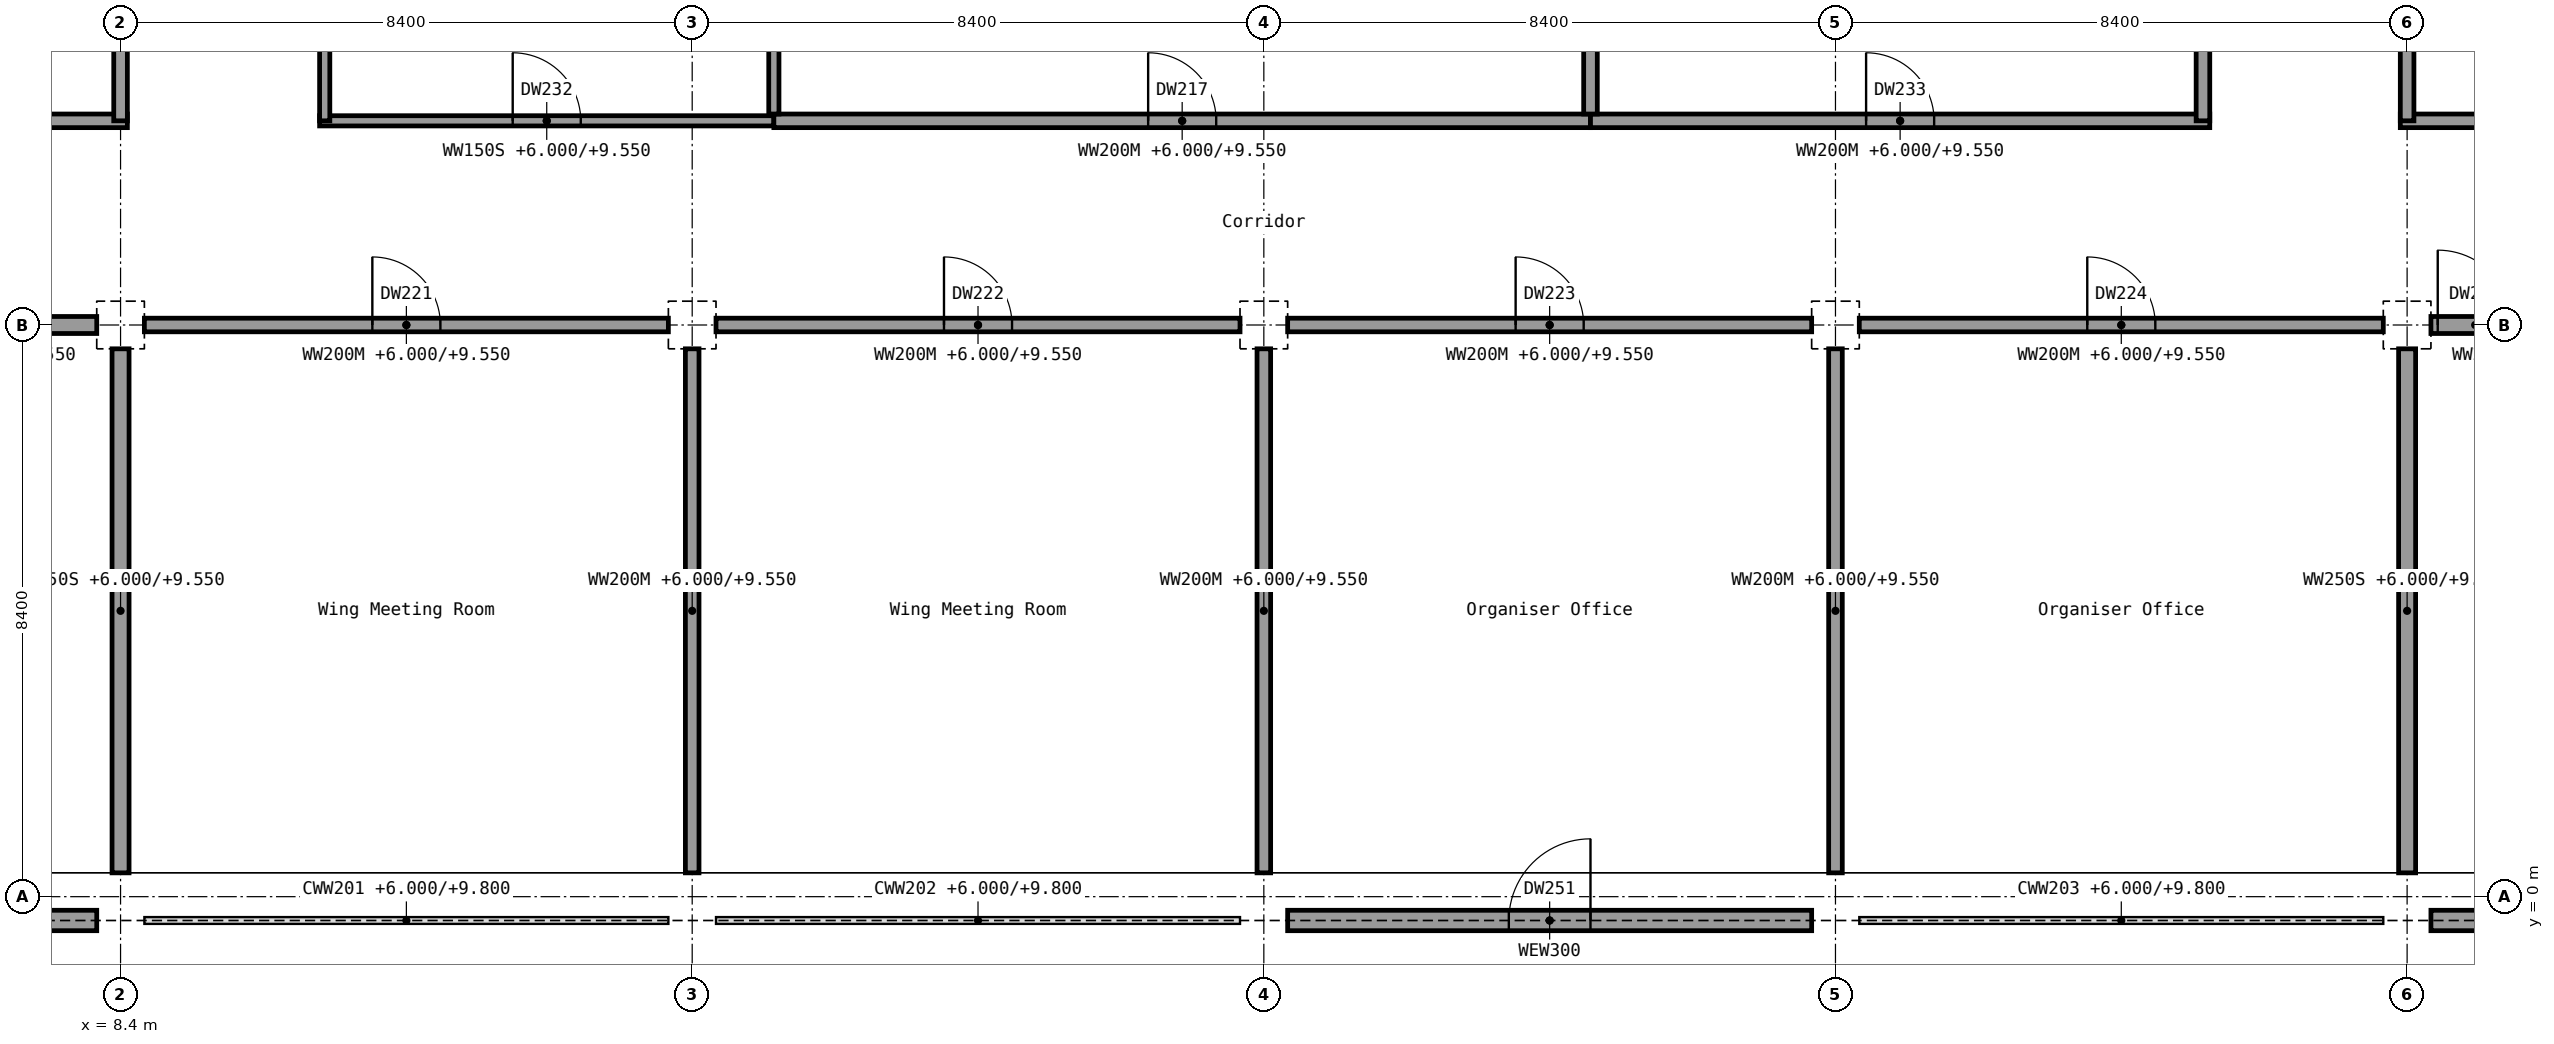
"""IFC4 building model, lengths in metres.
Left out: names, types, materials, properties, quantities, classifications, styles, units other than length and angle.
Written with IfcOpenShell. Run it as: python <this file> out.ifc"""

import sys

from ifc_helpers import new_model, si_unit, direction, frame, frame_2d, origin, origin_2d, place, context, subcontext, project, spatial, rectangle, extrude, element, fill, save


model = new_model("IFC4")
c1 = context("Model", 3, precision=1e-05, world=origin(), true_north=direction((0.0, 1.0)))
c2 = subcontext(c1, "Body", "Model", "MODEL_VIEW")
j1 = project(units=[si_unit("LENGTHUNIT", "METRE"), si_unit("PLANEANGLEUNIT", "RADIAN")], contexts=[c1])
p1 = place(None, origin())
s1 = spatial("IfcSite", under=j1, at=p1, CompositionType="ELEMENT")
p2 = place(p1, origin())
s2 = spatial("IfcBuilding", under=s1, at=p2, CompositionType="ELEMENT")
p3 = place(p2, frame((0.0, 0.0, 6.0)))
s3 = spatial("IfcBuildingStorey", under=s2, at=p3, CompositionType="ELEMENT", Elevation=6.0)
for number, where, z_axis, x_axis in (
    (1, (8.4, 0.0, 0.0), (0.0, 0.0, 1.0), (1.0, 0.0, 0.0)),
    (2, (8.4, 8.4, 0.0), (0.0, 0.0, 1.0), (1.0, 0.0, 0.0)),
    (3, (16.8, 0.0, 0.0), (0.0, 0.0, 1.0), (1.0, 0.0, 0.0)),
    (4, (16.8, 8.4, 0.0), (0.0, 0.0, 1.0), (1.0, 0.0, 0.0)),
    (5, (25.2, 0.0, 0.0), (0.0, 0.0, 1.0), (1.0, 0.0, 0.0)),
    (6, (25.2, 8.4, 0.0), (0.0, 0.0, 1.0), (1.0, 0.0, 0.0)),
    (7, (33.6, 0.0, 0.0), (0.0, 0.0, 1.0), (1.0, 0.0, 0.0)),
    (8, (33.6, 8.4, 0.0), (0.0, 0.0, 1.0), (1.0, 0.0, 0.0)),
    (9, (42.0, 0.0, 0.0), (0.0, 0.0, 1.0), (1.0, 0.0, 0.0)),
    (10, (42.0, 8.4, 0.0), (0.0, 0.0, 1.0), (1.0, 0.0, 0.0)),
):
    element("IfcColumn", number, at=place(p3, frame(where, z_axis=z_axis, x_axis=x_axis)), inside=s3, PredefinedType="COLUMN", context=c2, shape_type="SweptSolid", body=[
        extrude(rectangle(XDim=0.7, YDim=0.7, at=origin_2d()), origin(), (0.0, 0.0, 1.0), 4.5),
    ])
p4 = place(p3, frame((0.35, -0.35, 0.0), z_axis=(0.0, 0.0, 1.0), x_axis=(1.0, 0.0, 0.0)))
e11 = element("IfcWall", 11, at=p4, inside=s3, PredefinedType="SOLIDWALL", context=c2, shape_type="SweptSolid", body=[
    extrude(rectangle(XDim=7.7, YDim=0.3, at=frame_2d((3.85, 0.0))), origin(), (0.0, 0.0, 1.0), 3.8),
])
p5 = place(p4, frame((3.25, 0.0, 1.0)))
e12 = element("IfcOpeningElement", 12, at=p5, cuts=e11, PredefinedType="OPENING", context=c2, shape_type="SweptSolid", body=[
    extrude(rectangle(XDim=1.2, YDim=1.5, at=frame_2d((0.6, 0.75))), frame((0.0, 0.15, 0.0), z_axis=(0.0, -1.0, 0.0), x_axis=(1.0, 0.0, 0.0)), (0.0, 0.0, 1.0), 0.3),
])
p6 = place(p3, frame((25.55, -0.35, 0.0), z_axis=(0.0, 0.0, 1.0), x_axis=(1.0, 0.0, 0.0)))
e13 = element("IfcWall", 13, at=p6, inside=s3, PredefinedType="SOLIDWALL", context=c2, shape_type="SweptSolid", body=[
    extrude(rectangle(XDim=7.7, YDim=0.3, at=frame_2d((3.85, 0.0))), origin(), (0.0, 0.0, 1.0), 3.8),
])
p7 = place(p6, frame((3.25, 0.0, 0.0)))
e14 = element("IfcOpeningElement", 14, at=p7, cuts=e13, PredefinedType="OPENING", context=c2, shape_type="SweptSolid", body=[
    extrude(rectangle(XDim=1.2, YDim=2.1, at=frame_2d((0.6, 1.05))), frame((0.0, 0.15, 0.0), z_axis=(0.0, -1.0, 0.0), x_axis=(1.0, 0.0, 0.0)), (0.0, 0.0, 1.0), 0.3),
])
p8 = place(p3, frame((42.35, -0.35, 0.0), z_axis=(0.0, 0.0, 1.0), x_axis=(1.0, 0.0, 0.0)))
e15 = element("IfcWall", 15, at=p8, inside=s3, PredefinedType="SOLIDWALL", context=c2, shape_type="SweptSolid", body=[
    extrude(rectangle(XDim=7.7, YDim=0.3, at=frame_2d((3.85, 0.0))), origin(), (0.0, 0.0, 1.0), 3.8),
])
p9 = place(p8, frame((3.25, 0.0, 1.0)))
e16 = element("IfcOpeningElement", 16, at=p9, cuts=e15, PredefinedType="OPENING", context=c2, shape_type="SweptSolid", body=[
    extrude(rectangle(XDim=1.2, YDim=1.5, at=frame_2d((0.6, 0.75))), frame((0.0, 0.15, 0.0), z_axis=(0.0, -1.0, 0.0), x_axis=(1.0, 0.0, 0.0)), (0.0, 0.0, 1.0), 0.3),
])
p10 = place(p3, frame((4.375, 8.4, 0.0), z_axis=(0.0, 0.0, 1.0), x_axis=(1.0, 0.0, 0.0)))
e17 = element("IfcWall", 17, at=p10, inside=s3, PredefinedType="SHEAR", context=c2, shape_type="SweptSolid", body=[
    extrude(rectangle(XDim=3.675, YDim=0.25, at=frame_2d((1.837, 0.0))), origin(), (0.0, 0.0, 1.0), 3.55),
])
p11 = place(p10, frame((0.1, 0.0, 0.0)))
e18 = element("IfcOpeningElement", 18, at=p11, cuts=e17, PredefinedType="OPENING", context=c2, shape_type="SweptSolid", body=[
    extrude(rectangle(XDim=1.1, YDim=2.1, at=frame_2d((0.55, 1.05))), frame((0.0, 0.125, 0.0), z_axis=(0.0, -1.0, 0.0), x_axis=(1.0, 0.0, 0.0)), (0.0, 0.0, 1.0), 0.25),
])
p12 = place(p3, frame((8.75, 8.4, 0.0), z_axis=(0.0, 0.0, 1.0), x_axis=(1.0, 0.0, 0.0)))
e19 = element("IfcWall", 19, at=p12, inside=s3, PredefinedType="PARTITIONING", context=c2, shape_type="SweptSolid", body=[
    extrude(rectangle(XDim=7.7, YDim=0.2, at=frame_2d((3.85, 0.0))), origin(), (0.0, 0.0, 1.0), 3.55),
])
p13 = place(p12, frame((3.35, 0.0, 0.0)))
e20 = element("IfcOpeningElement", 20, at=p13, cuts=e19, PredefinedType="OPENING", context=c2, shape_type="SweptSolid", body=[
    extrude(rectangle(XDim=1.0, YDim=2.1, at=frame_2d((0.5, 1.05))), frame((0.0, 0.1, 0.0), z_axis=(0.0, -1.0, 0.0), x_axis=(1.0, 0.0, 0.0)), (0.0, 0.0, 1.0), 0.2),
])
p14 = place(p3, frame((17.15, 8.4, 0.0), z_axis=(0.0, 0.0, 1.0), x_axis=(1.0, 0.0, 0.0)))
e21 = element("IfcWall", 21, at=p14, inside=s3, PredefinedType="PARTITIONING", context=c2, shape_type="SweptSolid", body=[
    extrude(rectangle(XDim=7.7, YDim=0.2, at=frame_2d((3.85, 0.0))), origin(), (0.0, 0.0, 1.0), 3.55),
])
p15 = place(p14, frame((3.35, 0.0, 0.0)))
e22 = element("IfcOpeningElement", 22, at=p15, cuts=e21, PredefinedType="OPENING", context=c2, shape_type="SweptSolid", body=[
    extrude(rectangle(XDim=1.0, YDim=2.1, at=frame_2d((0.5, 1.05))), frame((0.0, 0.1, 0.0), z_axis=(0.0, -1.0, 0.0), x_axis=(1.0, 0.0, 0.0)), (0.0, 0.0, 1.0), 0.2),
])
p16 = place(p3, frame((25.55, 8.4, 0.0), z_axis=(0.0, 0.0, 1.0), x_axis=(1.0, 0.0, 0.0)))
e23 = element("IfcWall", 23, at=p16, inside=s3, PredefinedType="PARTITIONING", context=c2, shape_type="SweptSolid", body=[
    extrude(rectangle(XDim=7.7, YDim=0.2, at=frame_2d((3.85, 0.0))), origin(), (0.0, 0.0, 1.0), 3.55),
])
p17 = place(p16, frame((3.35, 0.0, 0.0)))
e24 = element("IfcOpeningElement", 24, at=p17, cuts=e23, PredefinedType="OPENING", context=c2, shape_type="SweptSolid", body=[
    extrude(rectangle(XDim=1.0, YDim=2.1, at=frame_2d((0.5, 1.05))), frame((0.0, 0.1, 0.0), z_axis=(0.0, -1.0, 0.0), x_axis=(1.0, 0.0, 0.0)), (0.0, 0.0, 1.0), 0.2),
])
p18 = place(p3, frame((33.95, 8.4, 0.0), z_axis=(0.0, 0.0, 1.0), x_axis=(1.0, 0.0, 0.0)))
e25 = element("IfcWall", 25, at=p18, inside=s3, PredefinedType="PARTITIONING", context=c2, shape_type="SweptSolid", body=[
    extrude(rectangle(XDim=7.7, YDim=0.2, at=frame_2d((3.85, 0.0))), origin(), (0.0, 0.0, 1.0), 3.55),
])
p19 = place(p18, frame((3.35, 0.0, 0.0)))
e26 = element("IfcOpeningElement", 26, at=p19, cuts=e25, PredefinedType="OPENING", context=c2, shape_type="SweptSolid", body=[
    extrude(rectangle(XDim=1.0, YDim=2.1, at=frame_2d((0.5, 1.05))), frame((0.0, 0.1, 0.0), z_axis=(0.0, -1.0, 0.0), x_axis=(1.0, 0.0, 0.0)), (0.0, 0.0, 1.0), 0.2),
])
p20 = place(p3, frame((42.35, 8.4, 0.0), z_axis=(0.0, 0.0, 1.0), x_axis=(1.0, 0.0, 0.0)))
e27 = element("IfcWall", 27, at=p20, inside=s3, PredefinedType="SHEAR", context=c2, shape_type="SweptSolid", body=[
    extrude(rectangle(XDim=3.675, YDim=0.25, at=frame_2d((1.837, 0.0))), origin(), (0.0, 0.0, 1.0), 3.55),
])
p21 = place(p20, frame((0.1, 0.0, 0.0)))
e28 = element("IfcOpeningElement", 28, at=p21, cuts=e27, PredefinedType="OPENING", context=c2, shape_type="SweptSolid", body=[
    extrude(rectangle(XDim=1.1, YDim=2.1, at=frame_2d((0.55, 1.05))), frame((0.0, 0.125, 0.0), z_axis=(0.0, -1.0, 0.0), x_axis=(1.0, 0.0, 0.0)), (0.0, 0.0, 1.0), 0.25),
])
p22 = place(p3, frame((0.0, 11.4, 0.0), z_axis=(0.0, 0.0, 1.0), x_axis=(1.0, 0.0, 0.0)))
e29 = element("IfcWall", 29, at=p22, inside=s3, PredefinedType="PARTITIONING", context=c2, shape_type="SweptSolid", body=[
    extrude(rectangle(XDim=8.5, YDim=0.2, at=frame_2d((4.25, 0.0))), origin(), (0.0, 0.0, 1.0), 3.45),
])
p23 = place(p3, frame((11.325, 11.4, 0.0), z_axis=(0.0, 0.0, 1.0), x_axis=(1.0, 0.0, 0.0)))
e30 = element("IfcWall", 30, at=p23, inside=s3, PredefinedType="PARTITIONING", context=c2, shape_type="SweptSolid", body=[
    extrude(rectangle(XDim=6.675, YDim=0.15, at=frame_2d((3.337, 0.0))), origin(), (0.0, 0.0, 1.0), 3.55),
])
p24 = place(p23, frame((2.837, 0.0, 0.0)))
e31 = element("IfcOpeningElement", 31, at=p24, cuts=e30, PredefinedType="OPENING", context=c2, shape_type="SweptSolid", body=[
    extrude(rectangle(XDim=1.0, YDim=2.1, at=frame_2d((0.5, 1.05))), frame((0.0, 0.075, 0.0), z_axis=(0.0, -1.0, 0.0), x_axis=(1.0, 0.0, 0.0)), (0.0, 0.0, 1.0), 0.15),
])
p25 = place(p3, frame((18.0, 11.4, 0.0), z_axis=(0.0, 0.0, 1.0), x_axis=(1.0, 0.0, 0.0)))
e32 = element("IfcWall", 32, at=p25, inside=s3, PredefinedType="PARTITIONING", context=c2, shape_type="SweptSolid", body=[
    extrude(rectangle(XDim=12.0, YDim=0.2, at=frame_2d((6.0, 0.0))), origin(), (0.0, 0.0, 1.0), 3.55),
])
p26 = place(p25, frame((5.5, 0.0, 0.0)))
e33 = element("IfcOpeningElement", 33, at=p26, cuts=e32, PredefinedType="OPENING", context=c2, shape_type="SweptSolid", body=[
    extrude(rectangle(XDim=1.0, YDim=2.1, at=frame_2d((0.5, 1.05))), frame((0.0, 0.1, 0.0), z_axis=(0.0, -1.0, 0.0), x_axis=(1.0, 0.0, 0.0)), (0.0, 0.0, 1.0), 0.2),
])
p27 = place(p3, frame((30.0, 11.4, 0.0), z_axis=(0.0, 0.0, 1.0), x_axis=(1.0, 0.0, 0.0)))
e34 = element("IfcWall", 34, at=p27, inside=s3, PredefinedType="PARTITIONING", context=c2, shape_type="SweptSolid", body=[
    extrude(rectangle(XDim=9.1, YDim=0.2, at=frame_2d((4.55, 0.0))), origin(), (0.0, 0.0, 1.0), 3.55),
])
p28 = place(p27, frame((4.05, 0.0, 0.0)))
e35 = element("IfcOpeningElement", 35, at=p28, cuts=e34, PredefinedType="OPENING", context=c2, shape_type="SweptSolid", body=[
    extrude(rectangle(XDim=1.0, YDim=2.1, at=frame_2d((0.5, 1.05))), frame((0.0, 0.1, 0.0), z_axis=(0.0, -1.0, 0.0), x_axis=(1.0, 0.0, 0.0)), (0.0, 0.0, 1.0), 0.2),
])
p29 = place(p3, frame((41.9, 11.4, 0.0), z_axis=(0.0, 0.0, 1.0), x_axis=(1.0, 0.0, 0.0)))
e36 = element("IfcWall", 36, at=p29, inside=s3, PredefinedType="PARTITIONING", context=c2, shape_type="SweptSolid", body=[
    extrude(rectangle(XDim=8.5, YDim=0.2, at=frame_2d((4.25, 0.0))), origin(), (0.0, 0.0, 1.0), 3.45),
])
p30 = place(p3, frame((8.4, 0.35, 0.0), z_axis=(0.0, 0.0, 1.0), x_axis=(0.0, 1.0, 0.0)))
e37 = element("IfcWall", 37, at=p30, inside=s3, PredefinedType="SHEAR", context=c2, shape_type="SweptSolid", body=[
    extrude(rectangle(XDim=7.7, YDim=0.25, at=frame_2d((3.85, 0.0))), origin(), (0.0, 0.0, 1.0), 3.55),
])
p31 = place(p3, frame((8.4, 11.4, 0.0), z_axis=(0.0, 0.0, 1.0), x_axis=(0.0, 1.0, 0.0)))
e38 = element("IfcWall", 38, at=p31, inside=s3, PredefinedType="PARTITIONING", context=c2, shape_type="SweptSolid", body=[
    extrude(rectangle(XDim=5.05, YDim=0.2, at=frame_2d((2.525, 0.0))), origin(), (0.0, 0.0, 1.0), 3.55),
])
p32 = place(p3, frame((11.4, 11.4, 0.0), z_axis=(0.0, 0.0, 1.0), x_axis=(0.0, 1.0, 0.0)))
e39 = element("IfcWall", 39, at=p32, inside=s3, PredefinedType="PARTITIONING", context=c2, shape_type="SweptSolid", body=[
    extrude(rectangle(XDim=5.4, YDim=0.15, at=frame_2d((2.7, 0.0))), origin(), (0.0, 0.0, 1.0), 3.55),
])
p33 = place(p3, frame((16.8, 0.35, 0.0), z_axis=(0.0, 0.0, 1.0), x_axis=(0.0, 1.0, 0.0)))
e40 = element("IfcWall", 40, at=p33, inside=s3, PredefinedType="PARTITIONING", context=c2, shape_type="SweptSolid", body=[
    extrude(rectangle(XDim=7.7, YDim=0.2, at=frame_2d((3.85, 0.0))), origin(), (0.0, 0.0, 1.0), 3.55),
])
p34 = place(p3, frame((18.0, 11.5, 0.0), z_axis=(0.0, 0.0, 1.0), x_axis=(0.0, 1.0, 0.0)))
e41 = element("IfcWall", 41, at=p34, inside=s3, PredefinedType="PARTITIONING", context=c2, shape_type="SweptSolid", body=[
    extrude(rectangle(XDim=5.175, YDim=0.15, at=frame_2d((2.587, 0.0))), origin(), (0.0, 0.0, 1.0), 4.15),
])
p35 = place(p3, frame((25.2, 0.35, 0.0), z_axis=(0.0, 0.0, 1.0), x_axis=(0.0, 1.0, 0.0)))
e42 = element("IfcWall", 42, at=p35, inside=s3, PredefinedType="PARTITIONING", context=c2, shape_type="SweptSolid", body=[
    extrude(rectangle(XDim=7.7, YDim=0.2, at=frame_2d((3.85, 0.0))), origin(), (0.0, 0.0, 1.0), 3.55),
])
p36 = place(p3, frame((30.0, 11.5, 0.0), z_axis=(0.0, 0.0, 1.0), x_axis=(0.0, 1.0, 0.0)))
e43 = element("IfcWall", 43, at=p36, inside=s3, PredefinedType="PARTITIONING", context=c2, shape_type="SweptSolid", body=[
    extrude(rectangle(XDim=5.15, YDim=0.2, at=frame_2d((2.575, 0.0))), origin(), (0.0, 0.0, 1.0), 4.15),
])
p37 = place(p3, frame((33.6, 0.35, 0.0), z_axis=(0.0, 0.0, 1.0), x_axis=(0.0, 1.0, 0.0)))
e44 = element("IfcWall", 44, at=p37, inside=s3, PredefinedType="PARTITIONING", context=c2, shape_type="SweptSolid", body=[
    extrude(rectangle(XDim=7.7, YDim=0.2, at=frame_2d((3.85, 0.0))), origin(), (0.0, 0.0, 1.0), 3.55),
])
p38 = place(p3, frame((39.0, 11.4, 0.0), z_axis=(0.0, 0.0, 1.0), x_axis=(0.0, 1.0, 0.0)))
e45 = element("IfcWall", 45, at=p38, inside=s3, PredefinedType="PARTITIONING", context=c2, shape_type="SweptSolid", body=[
    extrude(rectangle(XDim=5.4, YDim=0.2, at=frame_2d((2.7, 0.0))), origin(), (0.0, 0.0, 1.0), 3.55),
])
p39 = place(p3, frame((42.0, 0.35, 0.0), z_axis=(0.0, 0.0, 1.0), x_axis=(0.0, 1.0, 0.0)))
e46 = element("IfcWall", 46, at=p39, inside=s3, PredefinedType="SHEAR", context=c2, shape_type="SweptSolid", body=[
    extrude(rectangle(XDim=7.7, YDim=0.25, at=frame_2d((3.85, 0.0))), origin(), (0.0, 0.0, 1.0), 3.55),
])
p40 = place(p3, frame((42.0, 11.4, 0.0), z_axis=(0.0, 0.0, 1.0), x_axis=(0.0, 1.0, 0.0)))
e47 = element("IfcWall", 47, at=p40, inside=s3, PredefinedType="PARTITIONING", context=c2, shape_type="SweptSolid", body=[
    extrude(rectangle(XDim=5.05, YDim=0.2, at=frame_2d((2.525, 0.0))), origin(), (0.0, 0.0, 1.0), 3.55),
])
p41 = place(p40, frame((2.025, 0.0, 0.0)))
e48 = element("IfcOpeningElement", 48, at=p41, cuts=e47, PredefinedType="OPENING", context=c2, shape_type="SweptSolid", body=[
    extrude(rectangle(XDim=1.0, YDim=2.1, at=frame_2d((0.5, 1.05))), frame((0.0, 0.1, 0.0), z_axis=(0.0, -1.0, 0.0), x_axis=(1.0, 0.0, 0.0)), (0.0, 0.0, 1.0), 0.2),
])
p42 = place(p7, origin())
e49 = element("IfcDoor", 49, at=p42, inside=s3, OperationType="SINGLE_SWING_RIGHT", PredefinedType="DOOR", context=c2, shape_type="SweptSolid", body=[
    extrude(rectangle(XDim=1.2, YDim=2.1, at=frame_2d((0.6, 1.05))), frame((0.0, 0.025, 0.0), z_axis=(0.0, -1.0, 0.0), x_axis=(1.0, 0.0, 0.0)), (0.0, 0.0, 1.0), 0.05),
])
fill(e14, e49)
p43 = place(p21, origin())
e50 = element("IfcDoor", 50, at=p43, inside=s3, OperationType="SINGLE_SWING_LEFT", PredefinedType="DOOR", context=c2, shape_type="SweptSolid", body=[
    extrude(rectangle(XDim=1.1, YDim=2.1, at=frame_2d((0.55, 1.05))), frame((0.0, 0.025, 0.0), z_axis=(0.0, -1.0, 0.0), x_axis=(1.0, 0.0, 0.0)), (0.0, 0.0, 1.0), 0.05),
])
fill(e28, e50)
p44 = place(p26, origin())
e51 = element("IfcDoor", 51, at=p44, inside=s3, OperationType="SINGLE_SWING_LEFT", PredefinedType="DOOR", context=c2, shape_type="SweptSolid", body=[
    extrude(rectangle(XDim=1.0, YDim=2.1, at=frame_2d((0.5, 1.05))), frame((0.0, 0.025, 0.0), z_axis=(0.0, -1.0, 0.0), x_axis=(1.0, 0.0, 0.0)), (0.0, 0.0, 1.0), 0.05),
])
fill(e33, e51)
p45 = place(p13, origin())
e52 = element("IfcDoor", 52, at=p45, inside=s3, OperationType="SINGLE_SWING_LEFT", PredefinedType="DOOR", context=c2, shape_type="SweptSolid", body=[
    extrude(rectangle(XDim=1.0, YDim=2.1, at=frame_2d((0.5, 1.05))), frame((0.0, 0.025, 0.0), z_axis=(0.0, -1.0, 0.0), x_axis=(1.0, 0.0, 0.0)), (0.0, 0.0, 1.0), 0.05),
])
fill(e20, e52)
p46 = place(p15, origin())
e53 = element("IfcDoor", 53, at=p46, inside=s3, OperationType="SINGLE_SWING_LEFT", PredefinedType="DOOR", context=c2, shape_type="SweptSolid", body=[
    extrude(rectangle(XDim=1.0, YDim=2.1, at=frame_2d((0.5, 1.05))), frame((0.0, 0.025, 0.0), z_axis=(0.0, -1.0, 0.0), x_axis=(1.0, 0.0, 0.0)), (0.0, 0.0, 1.0), 0.05),
])
fill(e22, e53)
p47 = place(p17, origin())
e54 = element("IfcDoor", 54, at=p47, inside=s3, OperationType="SINGLE_SWING_LEFT", PredefinedType="DOOR", context=c2, shape_type="SweptSolid", body=[
    extrude(rectangle(XDim=1.0, YDim=2.1, at=frame_2d((0.5, 1.05))), frame((0.0, 0.025, 0.0), z_axis=(0.0, -1.0, 0.0), x_axis=(1.0, 0.0, 0.0)), (0.0, 0.0, 1.0), 0.05),
])
fill(e24, e54)
p48 = place(p19, origin())
e55 = element("IfcDoor", 55, at=p48, inside=s3, OperationType="SINGLE_SWING_LEFT", PredefinedType="DOOR", context=c2, shape_type="SweptSolid", body=[
    extrude(rectangle(XDim=1.0, YDim=2.1, at=frame_2d((0.5, 1.05))), frame((0.0, 0.025, 0.0), z_axis=(0.0, -1.0, 0.0), x_axis=(1.0, 0.0, 0.0)), (0.0, 0.0, 1.0), 0.05),
])
fill(e26, e55)
p49 = place(p24, origin())
e56 = element("IfcDoor", 56, at=p49, inside=s3, OperationType="SINGLE_SWING_LEFT", PredefinedType="DOOR", context=c2, shape_type="SweptSolid", body=[
    extrude(rectangle(XDim=1.0, YDim=2.1, at=frame_2d((0.5, 1.05))), frame((0.0, 0.025, 0.0), z_axis=(0.0, -1.0, 0.0), x_axis=(1.0, 0.0, 0.0)), (0.0, 0.0, 1.0), 0.05),
])
fill(e31, e56)
p50 = place(p28, origin())
e57 = element("IfcDoor", 57, at=p50, inside=s3, OperationType="SINGLE_SWING_LEFT", PredefinedType="DOOR", context=c2, shape_type="SweptSolid", body=[
    extrude(rectangle(XDim=1.0, YDim=2.1, at=frame_2d((0.5, 1.05))), frame((0.0, 0.025, 0.0), z_axis=(0.0, -1.0, 0.0), x_axis=(1.0, 0.0, 0.0)), (0.0, 0.0, 1.0), 0.05),
])
fill(e35, e57)
save(model, sys.argv[1])
